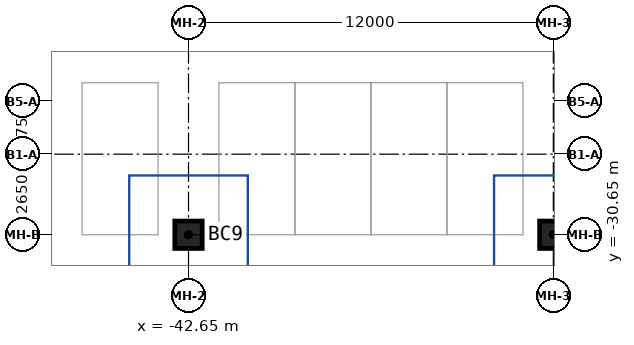
"""IFC4 building model, lengths in metres.
Left out: names, types, materials, properties, quantities, classifications, styles, units other than length and angle.
Written with IfcOpenShell. Run it as: python <this file> out.ifc"""

import sys

from ifc_helpers import new_model, si_unit, direction, frame, origin, origin_2d, place, context, subcontext, project, spatial, rectangle, extrude, source, transform, mapped, element, save


model = new_model("IFC4")
c1 = context("Model", 3, precision=1e-05, world=origin(), true_north=direction((0.0, 1.0)))
c2 = subcontext(c1, "Body", "Model", "MODEL_VIEW")
j1 = project(units=[si_unit("LENGTHUNIT", "METRE"), si_unit("PLANEANGLEUNIT", "RADIAN")], contexts=[c1])
p1 = place(None, origin())
s1 = spatial("IfcSite", under=j1, at=p1, CompositionType="ELEMENT")
p2 = place(p1, origin())
s2 = spatial("IfcBuilding", under=s1, at=p2, CompositionType="ELEMENT")
p3 = place(p2, frame((0.0, 0.0, -9.0)))
s3 = spatial("IfcBuildingStorey", under=s2, at=p3, CompositionType="ELEMENT", Elevation=-9.0)
m1 = source(origin(), c2, "Body", "SweptSolid", [
    extrude(rectangle(XDim=0.9, YDim=0.9, at=origin_2d()), origin(), (0.0, 0.0, 1.0), 4.5),
])
for number, where, z_axis, x_axis in (
    (1, (-42.65, -30.65, 0.0), (0.0, 0.0, 1.0), (1.0, 0.0, 0.0)),
    (2, (-30.65, -30.65, 0.0), (0.0, 0.0, 1.0), (1.0, 0.0, 0.0)),
):
    element("IfcColumn", number, at=place(p3, frame(where, z_axis=z_axis, x_axis=x_axis)), inside=s3, PredefinedType="COLUMN", context=c2, shape_type="MappedRepresentation", body=[
        mapped(m1, transform((0.0, 0.0, 0.0))),
    ])
save(model, sys.argv[1])
